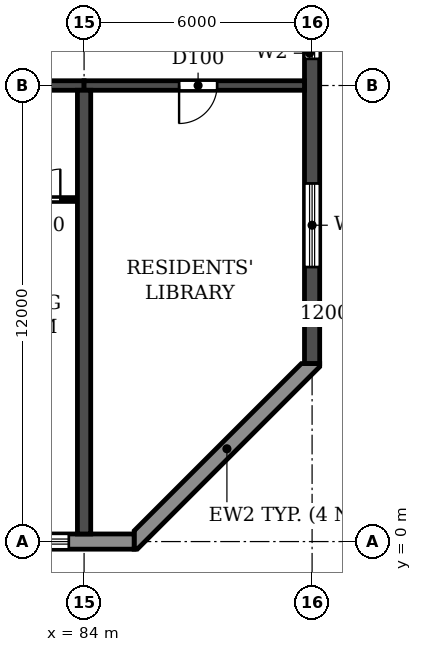
"""IFC4 building model, lengths in metres.
Left out: names, types, materials, properties, quantities, classifications, styles, units other than length and angle.
Written with IfcOpenShell. Run it as: python <this file> out.ifc"""

import sys

from ifc_helpers import new_model, si_unit, direction, frame, frame_2d, origin, place, context, subcontext, project, spatial, polyline, rectangle, outline, extrude, element, fill, save


model = new_model("IFC4")
c1 = context("Model", 3, precision=1e-05, world=origin(), true_north=direction((0.0, 1.0)))
c2 = subcontext(c1, "Body", "Model", "MODEL_VIEW")
j1 = project(units=[si_unit("LENGTHUNIT", "METRE"), si_unit("PLANEANGLEUNIT", "RADIAN")], contexts=[c1])
p1 = place(None, origin())
s1 = spatial("IfcSite", under=j1, at=p1, CompositionType="ELEMENT")
p2 = place(p1, origin())
s2 = spatial("IfcBuilding", under=s1, at=p2, CompositionType="ELEMENT")
p3 = place(p2, frame((0.0, 0.0, 109.2)))
s3 = spatial("IfcBuildingStorey", under=s2, at=p3, CompositionType="ELEMENT", Elevation=109.2)
p4 = place(p3, frame((84.0, 0.2, 0.0), z_axis=(0.0, 0.0, 1.0), x_axis=(0.0, 1.0, 0.0)))
e1 = element("IfcWall", 1, at=p4, inside=s3, PredefinedType="SHEAR", context=c2, shape_type="SweptSolid", body=[
    extrude(rectangle(XDim=11.675, YDim=0.35, at=frame_2d((5.837, 0.0))), origin(), (0.0, 0.0, 1.0), 3.06),
])
p5 = place(p3, frame((90.0, 4.683, 0.0), z_axis=(0.0, 0.0, 1.0), x_axis=(0.0, 1.0, 0.0)))
e2 = element("IfcWall", 2, at=p5, inside=s3, PredefinedType="SHEAR", context=c2, shape_type="SweptSolid", body=[
    extrude(rectangle(XDim=34.234, YDim=0.4, at=frame_2d((17.117, 0.0))), origin(), (0.0, 0.0, 1.0), 3.06),
])
p6 = place(p5, frame((15.917, 0.0, 0.9)))
e3 = element("IfcOpeningElement", 3, at=p6, cuts=e2, PredefinedType="OPENING", context=c2, shape_type="SweptSolid", body=[
    extrude(rectangle(XDim=1.2, YDim=1.5, at=frame_2d((0.6, 0.75))), frame((0.0, 0.21, 0.0), z_axis=(0.0, -1.0, 0.0), x_axis=(1.0, 0.0, 0.0)), (0.0, 0.0, 1.0), 0.42),
])
p7 = place(p5, frame((23.817, 0.0, 0.9)))
e4 = element("IfcOpeningElement", 4, at=p7, cuts=e2, PredefinedType="OPENING", context=c2, shape_type="SweptSolid", body=[
    extrude(rectangle(XDim=1.2, YDim=1.5, at=frame_2d((0.6, 0.75))), frame((0.0, 0.21, 0.0), z_axis=(0.0, -1.0, 0.0), x_axis=(1.0, 0.0, 0.0)), (0.0, 0.0, 1.0), 0.42),
])
p8 = place(p5, frame((8.017, 0.0, 0.9)))
e5 = element("IfcOpeningElement", 5, at=p8, cuts=e2, PredefinedType="OPENING", context=c2, shape_type="SweptSolid", body=[
    extrude(rectangle(XDim=1.2, YDim=1.5, at=frame_2d((0.6, 0.75))), frame((0.0, 0.21, 0.0), z_axis=(0.0, -1.0, 0.0), x_axis=(1.0, 0.0, 0.0)), (0.0, 0.0, 1.0), 0.42),
])
p9 = place(p5, frame((28.894, 0.0, 0.6)))
e6 = element("IfcOpeningElement", 6, at=p9, cuts=e2, PredefinedType="OPENING", context=c2, shape_type="SweptSolid", body=[
    extrude(rectangle(XDim=2.2, YDim=1.8, at=frame_2d((1.1, 0.9))), frame((0.0, 0.21, 0.0), z_axis=(0.0, -1.0, 0.0), x_axis=(1.0, 0.0, 0.0)), (0.0, 0.0, 1.0), 0.42),
])
p10 = place(p5, frame((2.541, 0.0, 0.6)))
e7 = element("IfcOpeningElement", 7, at=p10, cuts=e2, PredefinedType="OPENING", context=c2, shape_type="SweptSolid", body=[
    extrude(rectangle(XDim=2.2, YDim=1.8, at=frame_2d((1.1, 0.9))), frame((0.0, 0.21, 0.0), z_axis=(0.0, -1.0, 0.0), x_axis=(1.0, 0.0, 0.0)), (0.0, 0.0, 1.0), 0.42),
])
p11 = place(p3, frame((78.0, 12.0, 0.0), z_axis=(0.0, 0.0, 1.0), x_axis=(1.0, 0.0, 0.0)))
e8 = element("IfcWall", 8, at=p11, inside=s3, PredefinedType="SHEAR", context=c2, shape_type="SweptSolid", body=[
    extrude(rectangle(XDim=6.0, YDim=0.25, at=frame_2d((3.0, 0.0))), origin(), (0.0, 0.0, 1.0), 2.46),
])
p12 = place(p11, frame((2.55, 0.0, 0.0)))
e9 = element("IfcOpeningElement", 9, at=p12, cuts=e8, PredefinedType="OPENING", context=c2, shape_type="SweptSolid", body=[
    extrude(rectangle(XDim=1.0, YDim=2.1, at=frame_2d((0.5, 1.05))), frame((0.0, 0.135, 0.0), z_axis=(0.0, -1.0, 0.0), x_axis=(1.0, 0.0, 0.0)), (0.0, 0.0, 1.0), 0.27),
])
p13 = place(p3, frame((84.0, 12.0, 0.0), z_axis=(0.0, 0.0, 1.0), x_axis=(1.0, 0.0, 0.0)))
e10 = element("IfcWall", 10, at=p13, inside=s3, PredefinedType="SHEAR", context=c2, shape_type="SweptSolid", body=[
    extrude(rectangle(XDim=5.8, YDim=0.25, at=frame_2d((2.9, 0.0))), origin(), (0.0, 0.0, 1.0), 2.46),
])
p14 = place(p13, frame((2.5, 0.0, 0.0)))
e11 = element("IfcOpeningElement", 11, at=p14, cuts=e10, PredefinedType="OPENING", context=c2, shape_type="SweptSolid", body=[
    extrude(rectangle(XDim=1.0, YDim=2.1, at=frame_2d((0.5, 1.05))), frame((0.0, 0.135, 0.0), z_axis=(0.0, -1.0, 0.0), x_axis=(1.0, 0.0, 0.0)), (0.0, 0.0, 1.0), 0.27),
])
p15 = place(p3, frame((16.683, 0.0, 0.0), z_axis=(0.0, 0.0, 1.0), x_axis=(1.0, 0.0, 0.0)))
e12 = element("IfcWall", 12, at=p15, inside=s3, PredefinedType="STANDARD", context=c2, shape_type="SweptSolid", body=[
    extrude(rectangle(XDim=68.634, YDim=0.4, at=frame_2d((34.317, 0.0))), origin(), (0.0, 0.0, 1.0), 3.06),
])
p16 = place(p15, frame((1.717, 0.0, 0.9)))
e13 = element("IfcOpeningElement", 13, at=p16, cuts=e12, PredefinedType="OPENING", context=c2, shape_type="SweptSolid", body=[
    extrude(rectangle(XDim=2.2, YDim=1.5, at=frame_2d((1.1, 0.75))), frame((0.0, 0.21, 0.0), z_axis=(0.0, -1.0, 0.0), x_axis=(1.0, 0.0, 0.0)), (0.0, 0.0, 1.0), 0.42),
])
p17 = place(p15, frame((4.717, 0.0, 0.9)))
e14 = element("IfcOpeningElement", 14, at=p17, cuts=e12, PredefinedType="OPENING", context=c2, shape_type="SweptSolid", body=[
    extrude(rectangle(XDim=2.2, YDim=1.5, at=frame_2d((1.1, 0.75))), frame((0.0, 0.21, 0.0), z_axis=(0.0, -1.0, 0.0), x_axis=(1.0, 0.0, 0.0)), (0.0, 0.0, 1.0), 0.42),
])
p18 = place(p15, frame((7.717, 0.0, 0.9)))
e15 = element("IfcOpeningElement", 15, at=p18, cuts=e12, PredefinedType="OPENING", context=c2, shape_type="SweptSolid", body=[
    extrude(rectangle(XDim=2.2, YDim=1.5, at=frame_2d((1.1, 0.75))), frame((0.0, 0.21, 0.0), z_axis=(0.0, -1.0, 0.0), x_axis=(1.0, 0.0, 0.0)), (0.0, 0.0, 1.0), 0.42),
])
p19 = place(p15, frame((10.917, 0.0, 0.0)))
e16 = element("IfcOpeningElement", 16, at=p19, cuts=e12, PredefinedType="OPENING", context=c2, shape_type="SweptSolid", body=[
    extrude(rectangle(XDim=1.8, YDim=2.4, at=frame_2d((0.9, 1.2))), frame((0.0, 0.21, 0.0), z_axis=(0.0, -1.0, 0.0), x_axis=(1.0, 0.0, 0.0)), (0.0, 0.0, 1.0), 0.42),
])
p20 = place(p15, frame((13.717, 0.0, 0.9)))
e17 = element("IfcOpeningElement", 17, at=p20, cuts=e12, PredefinedType="OPENING", context=c2, shape_type="SweptSolid", body=[
    extrude(rectangle(XDim=2.2, YDim=1.5, at=frame_2d((1.1, 0.75))), frame((0.0, 0.21, 0.0), z_axis=(0.0, -1.0, 0.0), x_axis=(1.0, 0.0, 0.0)), (0.0, 0.0, 1.0), 0.42),
])
p21 = place(p15, frame((16.717, 0.0, 0.9)))
e18 = element("IfcOpeningElement", 18, at=p21, cuts=e12, PredefinedType="OPENING", context=c2, shape_type="SweptSolid", body=[
    extrude(rectangle(XDim=2.2, YDim=1.5, at=frame_2d((1.1, 0.75))), frame((0.0, 0.21, 0.0), z_axis=(0.0, -1.0, 0.0), x_axis=(1.0, 0.0, 0.0)), (0.0, 0.0, 1.0), 0.42),
])
p22 = place(p15, frame((19.717, 0.0, 0.9)))
e19 = element("IfcOpeningElement", 19, at=p22, cuts=e12, PredefinedType="OPENING", context=c2, shape_type="SweptSolid", body=[
    extrude(rectangle(XDim=2.2, YDim=1.5, at=frame_2d((1.1, 0.75))), frame((0.0, 0.21, 0.0), z_axis=(0.0, -1.0, 0.0), x_axis=(1.0, 0.0, 0.0)), (0.0, 0.0, 1.0), 0.42),
])
p23 = place(p15, frame((22.717, 0.0, 0.9)))
e20 = element("IfcOpeningElement", 20, at=p23, cuts=e12, PredefinedType="OPENING", context=c2, shape_type="SweptSolid", body=[
    extrude(rectangle(XDim=2.2, YDim=1.5, at=frame_2d((1.1, 0.75))), frame((0.0, 0.21, 0.0), z_axis=(0.0, -1.0, 0.0), x_axis=(1.0, 0.0, 0.0)), (0.0, 0.0, 1.0), 0.42),
])
p24 = place(p15, frame((25.717, 0.0, 0.9)))
e21 = element("IfcOpeningElement", 21, at=p24, cuts=e12, PredefinedType="OPENING", context=c2, shape_type="SweptSolid", body=[
    extrude(rectangle(XDim=2.2, YDim=1.5, at=frame_2d((1.1, 0.75))), frame((0.0, 0.21, 0.0), z_axis=(0.0, -1.0, 0.0), x_axis=(1.0, 0.0, 0.0)), (0.0, 0.0, 1.0), 0.42),
])
p25 = place(p15, frame((28.717, 0.0, 0.9)))
e22 = element("IfcOpeningElement", 22, at=p25, cuts=e12, PredefinedType="OPENING", context=c2, shape_type="SweptSolid", body=[
    extrude(rectangle(XDim=2.2, YDim=1.5, at=frame_2d((1.1, 0.75))), frame((0.0, 0.21, 0.0), z_axis=(0.0, -1.0, 0.0), x_axis=(1.0, 0.0, 0.0)), (0.0, 0.0, 1.0), 0.42),
])
p26 = place(p15, frame((31.917, 0.0, 0.0)))
e23 = element("IfcOpeningElement", 23, at=p26, cuts=e12, PredefinedType="OPENING", context=c2, shape_type="SweptSolid", body=[
    extrude(rectangle(XDim=1.8, YDim=2.4, at=frame_2d((0.9, 1.2))), frame((0.0, 0.21, 0.0), z_axis=(0.0, -1.0, 0.0), x_axis=(1.0, 0.0, 0.0)), (0.0, 0.0, 1.0), 0.42),
])
p27 = place(p15, frame((34.717, 0.0, 0.9)))
e24 = element("IfcOpeningElement", 24, at=p27, cuts=e12, PredefinedType="OPENING", context=c2, shape_type="SweptSolid", body=[
    extrude(rectangle(XDim=2.2, YDim=1.5, at=frame_2d((1.1, 0.75))), frame((0.0, 0.21, 0.0), z_axis=(0.0, -1.0, 0.0), x_axis=(1.0, 0.0, 0.0)), (0.0, 0.0, 1.0), 0.42),
])
p28 = place(p15, frame((37.717, 0.0, 0.9)))
e25 = element("IfcOpeningElement", 25, at=p28, cuts=e12, PredefinedType="OPENING", context=c2, shape_type="SweptSolid", body=[
    extrude(rectangle(XDim=2.2, YDim=1.5, at=frame_2d((1.1, 0.75))), frame((0.0, 0.21, 0.0), z_axis=(0.0, -1.0, 0.0), x_axis=(1.0, 0.0, 0.0)), (0.0, 0.0, 1.0), 0.42),
])
p29 = place(p15, frame((40.717, 0.0, 0.9)))
e26 = element("IfcOpeningElement", 26, at=p29, cuts=e12, PredefinedType="OPENING", context=c2, shape_type="SweptSolid", body=[
    extrude(rectangle(XDim=2.2, YDim=1.5, at=frame_2d((1.1, 0.75))), frame((0.0, 0.21, 0.0), z_axis=(0.0, -1.0, 0.0), x_axis=(1.0, 0.0, 0.0)), (0.0, 0.0, 1.0), 0.42),
])
p30 = place(p15, frame((43.717, 0.0, 0.9)))
e27 = element("IfcOpeningElement", 27, at=p30, cuts=e12, PredefinedType="OPENING", context=c2, shape_type="SweptSolid", body=[
    extrude(rectangle(XDim=2.2, YDim=1.5, at=frame_2d((1.1, 0.75))), frame((0.0, 0.21, 0.0), z_axis=(0.0, -1.0, 0.0), x_axis=(1.0, 0.0, 0.0)), (0.0, 0.0, 1.0), 0.42),
])
p31 = place(p15, frame((46.917, 0.0, 0.0)))
e28 = element("IfcOpeningElement", 28, at=p31, cuts=e12, PredefinedType="OPENING", context=c2, shape_type="SweptSolid", body=[
    extrude(rectangle(XDim=1.8, YDim=2.4, at=frame_2d((0.9, 1.2))), frame((0.0, 0.21, 0.0), z_axis=(0.0, -1.0, 0.0), x_axis=(1.0, 0.0, 0.0)), (0.0, 0.0, 1.0), 0.42),
])
p32 = place(p15, frame((49.717, 0.0, 0.9)))
e29 = element("IfcOpeningElement", 29, at=p32, cuts=e12, PredefinedType="OPENING", context=c2, shape_type="SweptSolid", body=[
    extrude(rectangle(XDim=2.2, YDim=1.5, at=frame_2d((1.1, 0.75))), frame((0.0, 0.21, 0.0), z_axis=(0.0, -1.0, 0.0), x_axis=(1.0, 0.0, 0.0)), (0.0, 0.0, 1.0), 0.42),
])
p33 = place(p15, frame((52.717, 0.0, 0.9)))
e30 = element("IfcOpeningElement", 30, at=p33, cuts=e12, PredefinedType="OPENING", context=c2, shape_type="SweptSolid", body=[
    extrude(rectangle(XDim=2.2, YDim=1.5, at=frame_2d((1.1, 0.75))), frame((0.0, 0.21, 0.0), z_axis=(0.0, -1.0, 0.0), x_axis=(1.0, 0.0, 0.0)), (0.0, 0.0, 1.0), 0.42),
])
p34 = place(p15, frame((55.717, 0.0, 0.9)))
e31 = element("IfcOpeningElement", 31, at=p34, cuts=e12, PredefinedType="OPENING", context=c2, shape_type="SweptSolid", body=[
    extrude(rectangle(XDim=2.2, YDim=1.5, at=frame_2d((1.1, 0.75))), frame((0.0, 0.21, 0.0), z_axis=(0.0, -1.0, 0.0), x_axis=(1.0, 0.0, 0.0)), (0.0, 0.0, 1.0), 0.42),
])
p35 = place(p15, frame((58.717, 0.0, 0.9)))
e32 = element("IfcOpeningElement", 32, at=p35, cuts=e12, PredefinedType="OPENING", context=c2, shape_type="SweptSolid", body=[
    extrude(rectangle(XDim=2.2, YDim=1.5, at=frame_2d((1.1, 0.75))), frame((0.0, 0.21, 0.0), z_axis=(0.0, -1.0, 0.0), x_axis=(1.0, 0.0, 0.0)), (0.0, 0.0, 1.0), 0.42),
])
p36 = place(p15, frame((61.717, 0.0, 0.9)))
e33 = element("IfcOpeningElement", 33, at=p36, cuts=e12, PredefinedType="OPENING", context=c2, shape_type="SweptSolid", body=[
    extrude(rectangle(XDim=2.2, YDim=1.5, at=frame_2d((1.1, 0.75))), frame((0.0, 0.21, 0.0), z_axis=(0.0, -1.0, 0.0), x_axis=(1.0, 0.0, 0.0)), (0.0, 0.0, 1.0), 0.42),
])
p37 = place(p15, frame((64.717, 0.0, 0.9)))
e34 = element("IfcOpeningElement", 34, at=p37, cuts=e12, PredefinedType="OPENING", context=c2, shape_type="SweptSolid", body=[
    extrude(rectangle(XDim=2.2, YDim=1.5, at=frame_2d((1.1, 0.75))), frame((0.0, 0.21, 0.0), z_axis=(0.0, -1.0, 0.0), x_axis=(1.0, 0.0, 0.0)), (0.0, 0.0, 1.0), 0.42),
])
p38 = place(p3, origin())
e35 = element("IfcWall", 35, at=p38, inside=s3, PredefinedType="STANDARD", context=c2, shape_type="SweptSolid", body=[
    extrude(outline(polyline([(85.317, -0.2), (85.4, -0.2), (90.2, 4.6), (90.2, 4.683), (89.717, 4.683), (85.317, 0.283), (85.317, -0.2)])), origin(), (0.0, 0.0, 1.0), 3.06),
])
p39 = place(p3, frame((81.9, 9.0, 0.0), z_axis=(0.0, 0.0, 1.0), x_axis=(1.0, 0.0, 0.0)))
e36 = element("IfcWall", 36, at=p39, inside=s3, PredefinedType="PARTITIONING", context=c2, shape_type="SweptSolid", body=[
    extrude(rectangle(XDim=1.915, YDim=0.1, at=frame_2d((0.958, 0.0))), origin(), (0.0, 0.0, 1.0), 3.06),
])
p40 = place(p39, frame((0.675, 0.0, 0.0)))
e37 = element("IfcOpeningElement", 37, at=p40, cuts=e36, PredefinedType="OPENING", context=c2, shape_type="SweptSolid", body=[
    extrude(rectangle(XDim=0.8, YDim=2.1, at=frame_2d((0.4, 1.05))), frame((0.0, 0.06, 0.0), z_axis=(0.0, -1.0, 0.0), x_axis=(1.0, 0.0, 0.0)), (0.0, 0.0, 1.0), 0.12),
])
p41 = place(p37, origin())
e38 = element("IfcWindow", 38, at=p41, inside=s3, PartitioningType="DOUBLE_PANEL_HORIZONTAL", PredefinedType="WINDOW", context=c2, shape_type="SweptSolid", body=[
    extrude(rectangle(XDim=2.2, YDim=1.5, at=frame_2d((1.1, 0.75))), frame((0.0, 0.03, 0.0), z_axis=(0.0, -1.0, 0.0), x_axis=(1.0, 0.0, 0.0)), (0.0, 0.0, 1.0), 0.06),
])
fill(e34, e38)
p42 = place(p8, origin())
e39 = element("IfcWindow", 39, at=p42, inside=s3, PartitioningType="SINGLE_PANEL", PredefinedType="WINDOW", context=c2, shape_type="SweptSolid", body=[
    extrude(rectangle(XDim=1.2, YDim=1.5, at=frame_2d((0.6, 0.75))), frame((0.0, 0.03, 0.0), z_axis=(0.0, -1.0, 0.0), x_axis=(1.0, 0.0, 0.0)), (0.0, 0.0, 1.0), 0.06),
])
fill(e5, e39)
p43 = place(p10, origin())
e40 = element("IfcWindow", 40, at=p43, inside=s3, PartitioningType="DOUBLE_PANEL_HORIZONTAL", PredefinedType="WINDOW", context=c2, shape_type="SweptSolid", body=[
    extrude(rectangle(XDim=2.2, YDim=1.8, at=frame_2d((1.1, 0.9))), frame((0.0, 0.03, 0.0), z_axis=(0.0, -1.0, 0.0), x_axis=(1.0, 0.0, 0.0)), (0.0, 0.0, 1.0), 0.06),
])
fill(e7, e40)
p44 = place(p40, origin())
e41 = element("IfcDoor", 41, at=p44, inside=s3, OperationType="SINGLE_SWING_RIGHT", PredefinedType="DOOR", context=c2, shape_type="SweptSolid", body=[
    extrude(rectangle(XDim=0.8, YDim=2.1, at=frame_2d((0.4, 1.05))), frame((0.0, 0.025, 0.0), z_axis=(0.0, -1.0, 0.0), x_axis=(1.0, 0.0, 0.0)), (0.0, 0.0, 1.0), 0.05),
])
fill(e37, e41)
p45 = place(p14, frame((1.0, 0.0, 0.0), z_axis=(0.0, 0.0, 1.0), x_axis=(-1.0, 0.0, 0.0)))
e42 = element("IfcDoor", 42, at=p45, inside=s3, OperationType="SINGLE_SWING_RIGHT", PredefinedType="DOOR", context=c2, shape_type="SweptSolid", body=[
    extrude(rectangle(XDim=1.0, YDim=2.1, at=frame_2d((0.5, 1.05))), frame((0.0, 0.025, 0.0), z_axis=(0.0, -1.0, 0.0), x_axis=(1.0, 0.0, 0.0)), (0.0, 0.0, 1.0), 0.05),
])
fill(e11, e42)
save(model, sys.argv[1])
